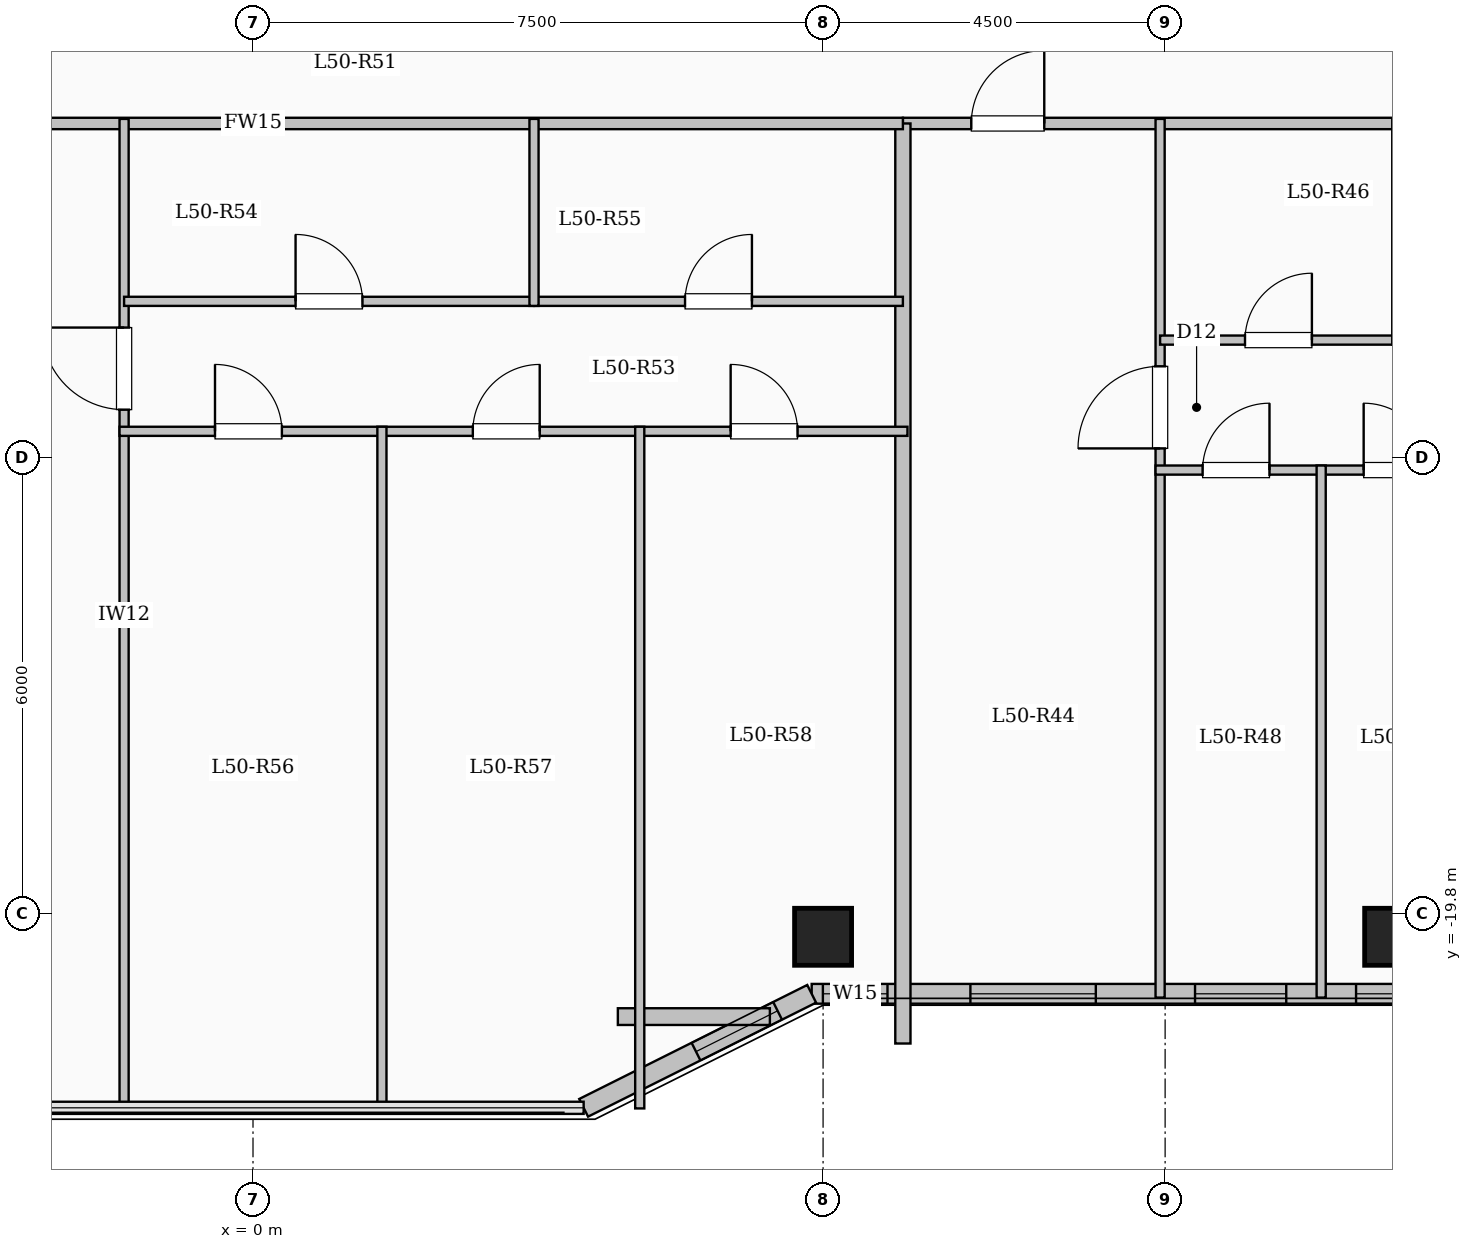
"""IFC4 building model, lengths in metres.
Left out: names, types, materials, properties, quantities, classifications, styles, units other than length and angle.
Written with IfcOpenShell. Run it as: python <this file> out.ifc"""

import sys

from ifc_helpers import new_model, si_unit, direction, frame, frame_2d, origin, origin_2d, place, context, subcontext, project, spatial, rectangle, extrude, element, fill, save


model = new_model("IFC4")
c1 = context("Model", 3, precision=1e-05, world=origin(), true_north=direction((0.0, 1.0)))
c2 = subcontext(c1, "Body", "Model", "MODEL_VIEW")
j1 = project(units=[si_unit("LENGTHUNIT", "METRE"), si_unit("PLANEANGLEUNIT", "RADIAN")], contexts=[c1])
p1 = place(None, origin())
s1 = spatial("IfcSite", under=j1, at=p1, CompositionType="ELEMENT")
p2 = place(p1, origin())
s2 = spatial("IfcBuilding", under=s1, at=p2, CompositionType="ELEMENT")
p3 = place(p2, frame((0.0, 0.0, 186.9)))
s3 = spatial("IfcBuildingStorey", under=s2, at=p3, CompositionType="ELEMENT", Elevation=186.9)
for number, where, z_axis, x_axis in (
    (1, (7.5, -20.1, 0.0), (0.0, 0.0, 1.0), (1.0, 0.0, 0.0)),
    (2, (15.0, -20.1, 0.0), (0.0, 0.0, 1.0), (1.0, 0.0, 0.0)),
):
    element("IfcColumn", number, at=place(p3, frame(where, z_axis=z_axis, x_axis=x_axis)), inside=s3, PredefinedType="COLUMN", context=c2, shape_type="SweptSolid", body=[
        extrude(rectangle(XDim=0.75, YDim=0.75, at=origin_2d()), origin(), (0.0, 0.0, 1.0), 3.35),
    ])
p4 = place(p3, frame((18.45, -20.85, 0.0), z_axis=(0.0, 0.0, 1.0), x_axis=(-1.0, 0.0, 0.0)))
e3 = element("IfcWall", 3, at=p4, inside=s3, PredefinedType="SOLIDWALL", context=c2, shape_type="SweptSolid", body=[
    extrude(rectangle(XDim=11.1, YDim=0.26, at=frame_2d((5.55, 0.0))), origin(), (0.0, 0.0, 1.0), 3.1),
])
p5 = place(p4, frame((0.56, 0.0, 0.95)))
e4 = element("IfcOpeningElement", 4, at=p5, cuts=e3, PredefinedType="OPENING", context=c2, shape_type="SweptSolid", body=[
    extrude(rectangle(XDim=1.2, YDim=1.5, at=frame_2d((0.6, 0.75))), frame((0.0, 0.14, 0.0), z_axis=(0.0, -1.0, 0.0), x_axis=(1.0, 0.0, 0.0)), (0.0, 0.0, 1.0), 0.28),
])
p6 = place(p4, frame((2.738, 0.0, 0.95)))
e5 = element("IfcOpeningElement", 5, at=p6, cuts=e3, PredefinedType="OPENING", context=c2, shape_type="SweptSolid", body=[
    extrude(rectangle(XDim=1.2, YDim=1.5, at=frame_2d((0.6, 0.75))), frame((0.0, 0.14, 0.0), z_axis=(0.0, -1.0, 0.0), x_axis=(1.0, 0.0, 0.0)), (0.0, 0.0, 1.0), 0.28),
])
p7 = place(p4, frame((4.856, 0.0, 0.95)))
e6 = element("IfcOpeningElement", 6, at=p7, cuts=e3, PredefinedType="OPENING", context=c2, shape_type="SweptSolid", body=[
    extrude(rectangle(XDim=1.2, YDim=1.5, at=frame_2d((0.6, 0.75))), frame((0.0, 0.14, 0.0), z_axis=(0.0, -1.0, 0.0), x_axis=(1.0, 0.0, 0.0)), (0.0, 0.0, 1.0), 0.28),
])
p8 = place(p4, frame((7.362, 0.0, 0.9)))
e7 = element("IfcOpeningElement", 7, at=p8, cuts=e3, PredefinedType="OPENING", context=c2, shape_type="SweptSolid", body=[
    extrude(rectangle(XDim=1.65, YDim=1.6, at=frame_2d((0.825, 0.8))), frame((0.0, 0.14, 0.0), z_axis=(0.0, -1.0, 0.0), x_axis=(1.0, 0.0, 0.0)), (0.0, 0.0, 1.0), 0.28),
])
p9 = place(p4, frame((10.103, 0.0, 0.95)))
e8 = element("IfcOpeningElement", 8, at=p9, cuts=e3, PredefinedType="OPENING", context=c2, shape_type="SweptSolid", body=[
    extrude(rectangle(XDim=0.85, YDim=1.5, at=frame_2d((0.425, 0.75))), frame((0.0, 0.14, 0.0), z_axis=(0.0, -1.0, 0.0), x_axis=(1.0, 0.0, 0.0)), (0.0, 0.0, 1.0), 0.28),
])
p10 = place(p3, frame((7.35, -20.85, 0.0), z_axis=(0.0, 0.0, 1.0), x_axis=(-0.894427191, -0.4472135955, 0.0)))
e9 = element("IfcWall", 9, at=p10, inside=s3, PredefinedType="SOLIDWALL", context=c2, shape_type="SweptSolid", body=[
    extrude(rectangle(XDim=3.354, YDim=0.26, at=frame_2d((1.677, 0.0))), origin(), (0.0, 0.0, 1.0), 3.1),
])
p11 = place(p10, frame((0.501, 0.0, 0.95)))
e10 = element("IfcOpeningElement", 10, at=p11, cuts=e9, PredefinedType="OPENING", context=c2, shape_type="SweptSolid", body=[
    extrude(rectangle(XDim=1.2, YDim=1.5, at=frame_2d((0.6, 0.75))), frame((0.0, 0.14, 0.0), z_axis=(0.0, -1.0, 0.0), x_axis=(1.0, 0.0, 0.0)), (0.0, 0.0, 1.0), 0.28),
])
p12 = place(p3, frame((4.8, -21.15, 0.0), z_axis=(0.0, 0.0, 1.0), x_axis=(1.0, 0.0, 0.0)))
e11 = element("IfcWall", 11, at=p12, inside=s3, PredefinedType="PARAPET", context=c2, shape_type="SweptSolid", body=[
    extrude(rectangle(XDim=2.0, YDim=0.22, at=frame_2d((1.0, 0.0))), origin(), (0.0, 0.0, 1.0), 0.85),
])
p13 = place(p3, frame((8.55, -9.4, 0.0), z_axis=(0.0, 0.0, 1.0), x_axis=(1.0, 0.0, 0.0)))
e12 = element("IfcWall", 12, at=p13, inside=s3, PredefinedType="PARTITIONING", context=c2, shape_type="SweptSolid", body=[
    extrude(rectangle(XDim=9.8, YDim=0.15, at=frame_2d((4.9, 0.0))), origin(), (0.0, 0.0, 1.0), 3.1),
])
p14 = place(p13, frame((0.9, 0.0, 0.0)))
e13 = element("IfcOpeningElement", 13, at=p14, cuts=e12, PredefinedType="OPENING", context=c2, shape_type="SweptSolid", body=[
    extrude(rectangle(XDim=0.96, YDim=2.15, at=frame_2d((0.48, 1.075))), frame((0.0, 0.085, 0.0), z_axis=(0.0, -1.0, 0.0), x_axis=(1.0, 0.0, 0.0)), (0.0, 0.0, 1.0), 0.17),
])
p15 = place(p3, frame((11.934, -20.9, 0.0), z_axis=(0.0, 0.0, 1.0), x_axis=(0.0, 1.0, 0.0)))
e14 = element("IfcWall", 14, at=p15, inside=s3, PredefinedType="PARTITIONING", context=c2, shape_type="SweptSolid", body=[
    extrude(rectangle(XDim=11.56, YDim=0.12, at=frame_2d((5.78, 0.0))), origin(), (0.0, 0.0, 1.0), 3.1),
])
p16 = place(p15, frame((7.225, 0.0, 0.0)))
e15 = element("IfcOpeningElement", 15, at=p16, cuts=e14, PredefinedType="OPENING", context=c2, shape_type="SweptSolid", body=[
    extrude(rectangle(XDim=1.08, YDim=2.15, at=frame_2d((0.54, 1.075))), frame((0.0, 0.07, 0.0), z_axis=(0.0, -1.0, 0.0), x_axis=(1.0, 0.0, 0.0)), (0.0, 0.0, 1.0), 0.14),
])
p17 = place(p3, frame((11.934, -12.25, 0.0), z_axis=(0.0, 0.0, 1.0), x_axis=(1.0, 0.0, 0.0)))
e16 = element("IfcWall", 16, at=p17, inside=s3, PredefinedType="PARTITIONING", context=c2, shape_type="SweptSolid", body=[
    extrude(rectangle(XDim=3.114, YDim=0.12, at=frame_2d((1.557, 0.0))), origin(), (0.0, 0.0, 1.0), 2.725),
])
p18 = place(p17, frame((1.117, 0.0, 0.0)))
e17 = element("IfcOpeningElement", 17, at=p18, cuts=e16, PredefinedType="OPENING", context=c2, shape_type="SweptSolid", body=[
    extrude(rectangle(XDim=0.88, YDim=2.1, at=frame_2d((0.44, 1.05))), frame((0.0, 0.07, 0.0), z_axis=(0.0, -1.0, 0.0), x_axis=(1.0, 0.0, 0.0)), (0.0, 0.0, 1.0), 0.14),
])
p19 = place(p3, frame((11.874, -13.96, 0.0), z_axis=(0.0, 0.0, 1.0), x_axis=(1.0, 0.0, 0.0)))
e18 = element("IfcWall", 18, at=p19, inside=s3, PredefinedType="PARTITIONING", context=c2, shape_type="SweptSolid", body=[
    extrude(rectangle(XDim=6.536, YDim=0.12, at=frame_2d((3.268, 0.0))), origin(), (0.0, 0.0, 1.0), 2.725),
])
p20 = place(p19, frame((0.619, 0.0, 0.0)))
e19 = element("IfcOpeningElement", 19, at=p20, cuts=e18, PredefinedType="OPENING", context=c2, shape_type="SweptSolid", body=[
    extrude(rectangle(XDim=0.88, YDim=2.1, at=frame_2d((0.44, 1.05))), frame((0.0, 0.07, 0.0), z_axis=(0.0, -1.0, 0.0), x_axis=(1.0, 0.0, 0.0)), (0.0, 0.0, 1.0), 0.14),
])
p21 = place(p19, frame((2.738, 0.0, 0.0)))
e20 = element("IfcOpeningElement", 20, at=p21, cuts=e18, PredefinedType="OPENING", context=c2, shape_type="SweptSolid", body=[
    extrude(rectangle(XDim=0.88, YDim=2.1, at=frame_2d((0.44, 1.05))), frame((0.0, 0.07, 0.0), z_axis=(0.0, -1.0, 0.0), x_axis=(1.0, 0.0, 0.0)), (0.0, 0.0, 1.0), 0.14),
])
p22 = place(p19, frame((4.857, 0.0, 0.0)))
e21 = element("IfcOpeningElement", 21, at=p22, cuts=e18, PredefinedType="OPENING", context=c2, shape_type="SweptSolid", body=[
    extrude(rectangle(XDim=0.88, YDim=2.1, at=frame_2d((0.44, 1.05))), frame((0.0, 0.07, 0.0), z_axis=(0.0, -1.0, 0.0), x_axis=(1.0, 0.0, 0.0)), (0.0, 0.0, 1.0), 0.14),
])
p23 = place(p3, frame((15.048, -12.31, 0.0), z_axis=(0.0, 0.0, 1.0), x_axis=(0.0, 1.0, 0.0)))
e22 = element("IfcWall", 22, at=p23, inside=s3, PredefinedType="PARTITIONING", context=c2, shape_type="SweptSolid", body=[
    extrude(rectangle(XDim=2.97, YDim=0.12, at=frame_2d((1.485, 0.0))), origin(), (0.0, 0.0, 1.0), 2.585),
])
p24 = place(p3, frame((14.053, -20.9, 0.0), z_axis=(0.0, 0.0, 1.0), x_axis=(0.0, 1.0, 0.0)))
e23 = element("IfcWall", 23, at=p24, inside=s3, PredefinedType="PARTITIONING", context=c2, shape_type="SweptSolid", body=[
    extrude(rectangle(XDim=7.0, YDim=0.12, at=frame_2d((3.5, 0.0))), origin(), (0.0, 0.0, 1.0), 3.1),
])
p25 = place(p3, frame((8.55, -21.504, 0.0), z_axis=(0.0, 0.0, 1.0), x_axis=(0.0, 1.0, 0.0)))
e24 = element("IfcWall", 24, at=p25, inside=s3, PredefinedType="SOLIDWALL", context=c2, shape_type="SweptSolid", body=[
    extrude(rectangle(XDim=12.104, YDim=0.2, at=frame_2d((6.052, 0.0))), origin(), (0.0, 0.0, 1.0), 3.1),
])
p26 = place(p3, frame((-8.55, -9.4, 0.0), z_axis=(0.0, 0.0, 1.0), x_axis=(1.0, 0.0, 0.0)))
e25 = element("IfcWall", 25, at=p26, inside=s3, PredefinedType="PARTITIONING", context=c2, shape_type="SweptSolid", body=[
    extrude(rectangle(XDim=17.1, YDim=0.15, at=frame_2d((8.55, 0.0))), origin(), (0.0, 0.0, 1.0), 3.1),
])
p27 = place(p26, frame((1.9, 0.0, 0.0)))
e26 = element("IfcOpeningElement", 26, at=p27, cuts=e25, PredefinedType="OPENING", context=c2, shape_type="SweptSolid", body=[
    extrude(rectangle(XDim=0.96, YDim=2.15, at=frame_2d((0.48, 1.075))), frame((0.0, 0.085, 0.0), z_axis=(0.0, -1.0, 0.0), x_axis=(1.0, 0.0, 0.0)), (0.0, 0.0, 1.0), 0.17),
])
p28 = place(p3, frame((-1.696, -22.38, 0.0), z_axis=(0.0, 0.0, 1.0), x_axis=(0.0, 1.0, 0.0)))
e27 = element("IfcWall", 27, at=p28, inside=s3, PredefinedType="PARTITIONING", context=c2, shape_type="SweptSolid", body=[
    extrude(rectangle(XDim=13.04, YDim=0.12, at=frame_2d((6.52, 0.0))), origin(), (0.0, 0.0, 1.0), 3.1),
])
p29 = place(p28, frame((9.215, 0.0, 0.0)))
e28 = element("IfcOpeningElement", 28, at=p29, cuts=e27, PredefinedType="OPENING", context=c2, shape_type="SweptSolid", body=[
    extrude(rectangle(XDim=1.08, YDim=2.15, at=frame_2d((0.54, 1.075))), frame((0.0, 0.07, 0.0), z_axis=(0.0, -1.0, 0.0), x_axis=(1.0, 0.0, 0.0)), (0.0, 0.0, 1.0), 0.14),
])
p30 = place(p3, frame((-1.696, -11.74, 0.0), z_axis=(0.0, 0.0, 1.0), x_axis=(1.0, 0.0, 0.0)))
e29 = element("IfcWall", 29, at=p30, inside=s3, PredefinedType="PARTITIONING", context=c2, shape_type="SweptSolid", body=[
    extrude(rectangle(XDim=5.393, YDim=0.12, at=frame_2d((2.697, 0.0))), origin(), (0.0, 0.0, 1.0), 3.1),
])
p31 = place(p30, frame((2.256, 0.0, 0.0)))
e30 = element("IfcOpeningElement", 30, at=p31, cuts=e29, PredefinedType="OPENING", context=c2, shape_type="SweptSolid", body=[
    extrude(rectangle(XDim=0.88, YDim=2.1, at=frame_2d((0.44, 1.05))), frame((0.0, 0.07, 0.0), z_axis=(0.0, -1.0, 0.0), x_axis=(1.0, 0.0, 0.0)), (0.0, 0.0, 1.0), 0.14),
])
p32 = place(p3, frame((3.697, -11.74, 0.0), z_axis=(0.0, 0.0, 1.0), x_axis=(1.0, 0.0, 0.0)))
e31 = element("IfcWall", 31, at=p32, inside=s3, PredefinedType="PARTITIONING", context=c2, shape_type="SweptSolid", body=[
    extrude(rectangle(XDim=4.853, YDim=0.12, at=frame_2d((2.427, 0.0))), origin(), (0.0, 0.0, 1.0), 3.1),
])
p33 = place(p32, frame((1.987, 0.0, 0.0)))
e32 = element("IfcOpeningElement", 32, at=p33, cuts=e31, PredefinedType="OPENING", context=c2, shape_type="SweptSolid", body=[
    extrude(rectangle(XDim=0.88, YDim=2.1, at=frame_2d((0.44, 1.05))), frame((0.0, 0.07, 0.0), z_axis=(0.0, -1.0, 0.0), x_axis=(1.0, 0.0, 0.0)), (0.0, 0.0, 1.0), 0.14),
])
p34 = place(p3, frame((-1.756, -13.45, 0.0), z_axis=(0.0, 0.0, 1.0), x_axis=(1.0, 0.0, 0.0)))
e33 = element("IfcWall", 33, at=p34, inside=s3, PredefinedType="PARTITIONING", context=c2, shape_type="SweptSolid", body=[
    extrude(rectangle(XDim=10.366, YDim=0.12, at=frame_2d((5.183, 0.0))), origin(), (0.0, 0.0, 1.0), 3.1),
])
p35 = place(p34, frame((1.256, 0.0, 0.0)))
e34 = element("IfcOpeningElement", 34, at=p35, cuts=e33, PredefinedType="OPENING", context=c2, shape_type="SweptSolid", body=[
    extrude(rectangle(XDim=0.88, YDim=2.1, at=frame_2d((0.44, 1.05))), frame((0.0, 0.07, 0.0), z_axis=(0.0, -1.0, 0.0), x_axis=(1.0, 0.0, 0.0)), (0.0, 0.0, 1.0), 0.14),
])
p36 = place(p34, frame((4.648, 0.0, 0.0)))
e35 = element("IfcOpeningElement", 35, at=p36, cuts=e33, PredefinedType="OPENING", context=c2, shape_type="SweptSolid", body=[
    extrude(rectangle(XDim=0.88, YDim=2.1, at=frame_2d((0.44, 1.05))), frame((0.0, 0.07, 0.0), z_axis=(0.0, -1.0, 0.0), x_axis=(1.0, 0.0, 0.0)), (0.0, 0.0, 1.0), 0.14),
])
p37 = place(p34, frame((8.04, 0.0, 0.0)))
e36 = element("IfcOpeningElement", 36, at=p37, cuts=e33, PredefinedType="OPENING", context=c2, shape_type="SweptSolid", body=[
    extrude(rectangle(XDim=0.88, YDim=2.1, at=frame_2d((0.44, 1.05))), frame((0.0, 0.07, 0.0), z_axis=(0.0, -1.0, 0.0), x_axis=(1.0, 0.0, 0.0)), (0.0, 0.0, 1.0), 0.14),
])
p38 = place(p3, frame((3.697, -11.8, 0.0), z_axis=(0.0, 0.0, 1.0), x_axis=(0.0, 1.0, 0.0)))
e37 = element("IfcWall", 37, at=p38, inside=s3, PredefinedType="PARTITIONING", context=c2, shape_type="SweptSolid", body=[
    extrude(rectangle(XDim=2.46, YDim=0.12, at=frame_2d((1.23, 0.0))), origin(), (0.0, 0.0, 1.0), 3.1),
])
p39 = place(p3, frame((1.696, -22.38, 0.0), z_axis=(0.0, 0.0, 1.0), x_axis=(0.0, 1.0, 0.0)))
e38 = element("IfcWall", 38, at=p39, inside=s3, PredefinedType="PARTITIONING", context=c2, shape_type="SweptSolid", body=[
    extrude(rectangle(XDim=8.99, YDim=0.12, at=frame_2d((4.495, 0.0))), origin(), (0.0, 0.0, 1.0), 3.1),
])
p40 = place(p3, frame((5.088, -22.358, 0.0), z_axis=(0.0, 0.0, 1.0), x_axis=(0.0, 1.0, 0.0)))
e39 = element("IfcWall", 39, at=p40, inside=s3, PredefinedType="PARTITIONING", context=c2, shape_type="SweptSolid", body=[
    extrude(rectangle(XDim=8.968, YDim=0.12, at=frame_2d((4.484, 0.0))), origin(), (0.0, 0.0, 1.0), 3.1),
])
p41 = place(p6, origin())
e40 = element("IfcWindow", 40, at=p41, inside=s3, PartitioningType="SINGLE_PANEL", PredefinedType="WINDOW", context=c2, shape_type="SweptSolid", body=[
    extrude(rectangle(XDim=1.2, YDim=1.5, at=frame_2d((0.6, 0.75))), frame((0.0, 0.03, 0.0), z_axis=(0.0, -1.0, 0.0), x_axis=(1.0, 0.0, 0.0)), (0.0, 0.0, 1.0), 0.06),
])
fill(e5, e40)
p42 = place(p7, origin())
e41 = element("IfcWindow", 41, at=p42, inside=s3, PartitioningType="SINGLE_PANEL", PredefinedType="WINDOW", context=c2, shape_type="SweptSolid", body=[
    extrude(rectangle(XDim=1.2, YDim=1.5, at=frame_2d((0.6, 0.75))), frame((0.0, 0.03, 0.0), z_axis=(0.0, -1.0, 0.0), x_axis=(1.0, 0.0, 0.0)), (0.0, 0.0, 1.0), 0.06),
])
fill(e6, e41)
p43 = place(p8, origin())
e42 = element("IfcWindow", 42, at=p43, inside=s3, PartitioningType="SINGLE_PANEL", PredefinedType="WINDOW", context=c2, shape_type="SweptSolid", body=[
    extrude(rectangle(XDim=1.65, YDim=1.6, at=frame_2d((0.825, 0.8))), frame((0.0, 0.03, 0.0), z_axis=(0.0, -1.0, 0.0), x_axis=(1.0, 0.0, 0.0)), (0.0, 0.0, 1.0), 0.06),
])
fill(e7, e42)
p44 = place(p9, origin())
e43 = element("IfcWindow", 43, at=p44, inside=s3, PartitioningType="SINGLE_PANEL", PredefinedType="WINDOW", context=c2, shape_type="SweptSolid", body=[
    extrude(rectangle(XDim=0.85, YDim=1.5, at=frame_2d((0.425, 0.75))), frame((0.0, 0.03, 0.0), z_axis=(0.0, -1.0, 0.0), x_axis=(1.0, 0.0, 0.0)), (0.0, 0.0, 1.0), 0.06),
])
fill(e8, e43)
p45 = place(p11, origin())
e44 = element("IfcWindow", 44, at=p45, inside=s3, PartitioningType="SINGLE_PANEL", PredefinedType="WINDOW", context=c2, shape_type="SweptSolid", body=[
    extrude(rectangle(XDim=1.2, YDim=1.5, at=frame_2d((0.6, 0.75))), frame((0.0, 0.03, 0.0), z_axis=(0.0, -1.0, 0.0), x_axis=(1.0, 0.0, 0.0)), (0.0, 0.0, 1.0), 0.06),
])
fill(e10, e44)
p46 = place(p14, origin())
e45 = element("IfcDoor", 45, at=p46, inside=s3, OperationType="SINGLE_SWING_RIGHT", PredefinedType="DOOR", context=c2, shape_type="SweptSolid", body=[
    extrude(rectangle(XDim=0.96, YDim=2.15, at=frame_2d((0.48, 1.075))), frame((0.0, 0.025, 0.0), z_axis=(0.0, -1.0, 0.0), x_axis=(1.0, 0.0, 0.0)), (0.0, 0.0, 1.0), 0.05),
])
fill(e13, e45)
p47 = place(p16, origin())
e46 = element("IfcDoor", 46, at=p47, inside=s3, OperationType="SINGLE_SWING_LEFT", PredefinedType="DOOR", context=c2, shape_type="SweptSolid", body=[
    extrude(rectangle(XDim=1.08, YDim=2.15, at=frame_2d((0.54, 1.075))), frame((0.0, 0.025, 0.0), z_axis=(0.0, -1.0, 0.0), x_axis=(1.0, 0.0, 0.0)), (0.0, 0.0, 1.0), 0.05),
])
fill(e15, e46)
p48 = place(p18, origin())
e47 = element("IfcDoor", 47, at=p48, inside=s3, OperationType="SINGLE_SWING_RIGHT", PredefinedType="DOOR", context=c2, shape_type="SweptSolid", body=[
    extrude(rectangle(XDim=0.88, YDim=2.1, at=frame_2d((0.44, 1.05))), frame((0.0, 0.025, 0.0), z_axis=(0.0, -1.0, 0.0), x_axis=(1.0, 0.0, 0.0)), (0.0, 0.0, 1.0), 0.05),
])
fill(e17, e47)
p49 = place(p20, origin())
e48 = element("IfcDoor", 48, at=p49, inside=s3, OperationType="SINGLE_SWING_RIGHT", PredefinedType="DOOR", context=c2, shape_type="SweptSolid", body=[
    extrude(rectangle(XDim=0.88, YDim=2.1, at=frame_2d((0.44, 1.05))), frame((0.0, 0.025, 0.0), z_axis=(0.0, -1.0, 0.0), x_axis=(1.0, 0.0, 0.0)), (0.0, 0.0, 1.0), 0.05),
])
fill(e19, e48)
p50 = place(p21, origin())
e49 = element("IfcDoor", 49, at=p50, inside=s3, OperationType="SINGLE_SWING_LEFT", PredefinedType="DOOR", context=c2, shape_type="SweptSolid", body=[
    extrude(rectangle(XDim=0.88, YDim=2.1, at=frame_2d((0.44, 1.05))), frame((0.0, 0.025, 0.0), z_axis=(0.0, -1.0, 0.0), x_axis=(1.0, 0.0, 0.0)), (0.0, 0.0, 1.0), 0.05),
])
fill(e20, e49)
p51 = place(p29, origin())
e50 = element("IfcDoor", 50, at=p51, inside=s3, OperationType="SINGLE_SWING_RIGHT", PredefinedType="DOOR", context=c2, shape_type="SweptSolid", body=[
    extrude(rectangle(XDim=1.08, YDim=2.15, at=frame_2d((0.54, 1.075))), frame((0.0, 0.025, 0.0), z_axis=(0.0, -1.0, 0.0), x_axis=(1.0, 0.0, 0.0)), (0.0, 0.0, 1.0), 0.05),
])
fill(e28, e50)
p52 = place(p31, origin())
e51 = element("IfcDoor", 51, at=p52, inside=s3, OperationType="SINGLE_SWING_LEFT", PredefinedType="DOOR", context=c2, shape_type="SweptSolid", body=[
    extrude(rectangle(XDim=0.88, YDim=2.1, at=frame_2d((0.44, 1.05))), frame((0.0, 0.025, 0.0), z_axis=(0.0, -1.0, 0.0), x_axis=(1.0, 0.0, 0.0)), (0.0, 0.0, 1.0), 0.05),
])
fill(e30, e51)
p53 = place(p33, origin())
e52 = element("IfcDoor", 52, at=p53, inside=s3, OperationType="SINGLE_SWING_RIGHT", PredefinedType="DOOR", context=c2, shape_type="SweptSolid", body=[
    extrude(rectangle(XDim=0.88, YDim=2.1, at=frame_2d((0.44, 1.05))), frame((0.0, 0.025, 0.0), z_axis=(0.0, -1.0, 0.0), x_axis=(1.0, 0.0, 0.0)), (0.0, 0.0, 1.0), 0.05),
])
fill(e32, e52)
p54 = place(p35, origin())
e53 = element("IfcDoor", 53, at=p54, inside=s3, OperationType="SINGLE_SWING_LEFT", PredefinedType="DOOR", context=c2, shape_type="SweptSolid", body=[
    extrude(rectangle(XDim=0.88, YDim=2.1, at=frame_2d((0.44, 1.05))), frame((0.0, 0.025, 0.0), z_axis=(0.0, -1.0, 0.0), x_axis=(1.0, 0.0, 0.0)), (0.0, 0.0, 1.0), 0.05),
])
fill(e34, e53)
p55 = place(p36, origin())
e54 = element("IfcDoor", 54, at=p55, inside=s3, OperationType="SINGLE_SWING_RIGHT", PredefinedType="DOOR", context=c2, shape_type="SweptSolid", body=[
    extrude(rectangle(XDim=0.88, YDim=2.1, at=frame_2d((0.44, 1.05))), frame((0.0, 0.025, 0.0), z_axis=(0.0, -1.0, 0.0), x_axis=(1.0, 0.0, 0.0)), (0.0, 0.0, 1.0), 0.05),
])
fill(e35, e54)
p56 = place(p37, origin())
e55 = element("IfcDoor", 55, at=p56, inside=s3, OperationType="SINGLE_SWING_LEFT", PredefinedType="DOOR", context=c2, shape_type="SweptSolid", body=[
    extrude(rectangle(XDim=0.88, YDim=2.1, at=frame_2d((0.44, 1.05))), frame((0.0, 0.025, 0.0), z_axis=(0.0, -1.0, 0.0), x_axis=(1.0, 0.0, 0.0)), (0.0, 0.0, 1.0), 0.05),
])
fill(e36, e55)
save(model, sys.argv[1])
